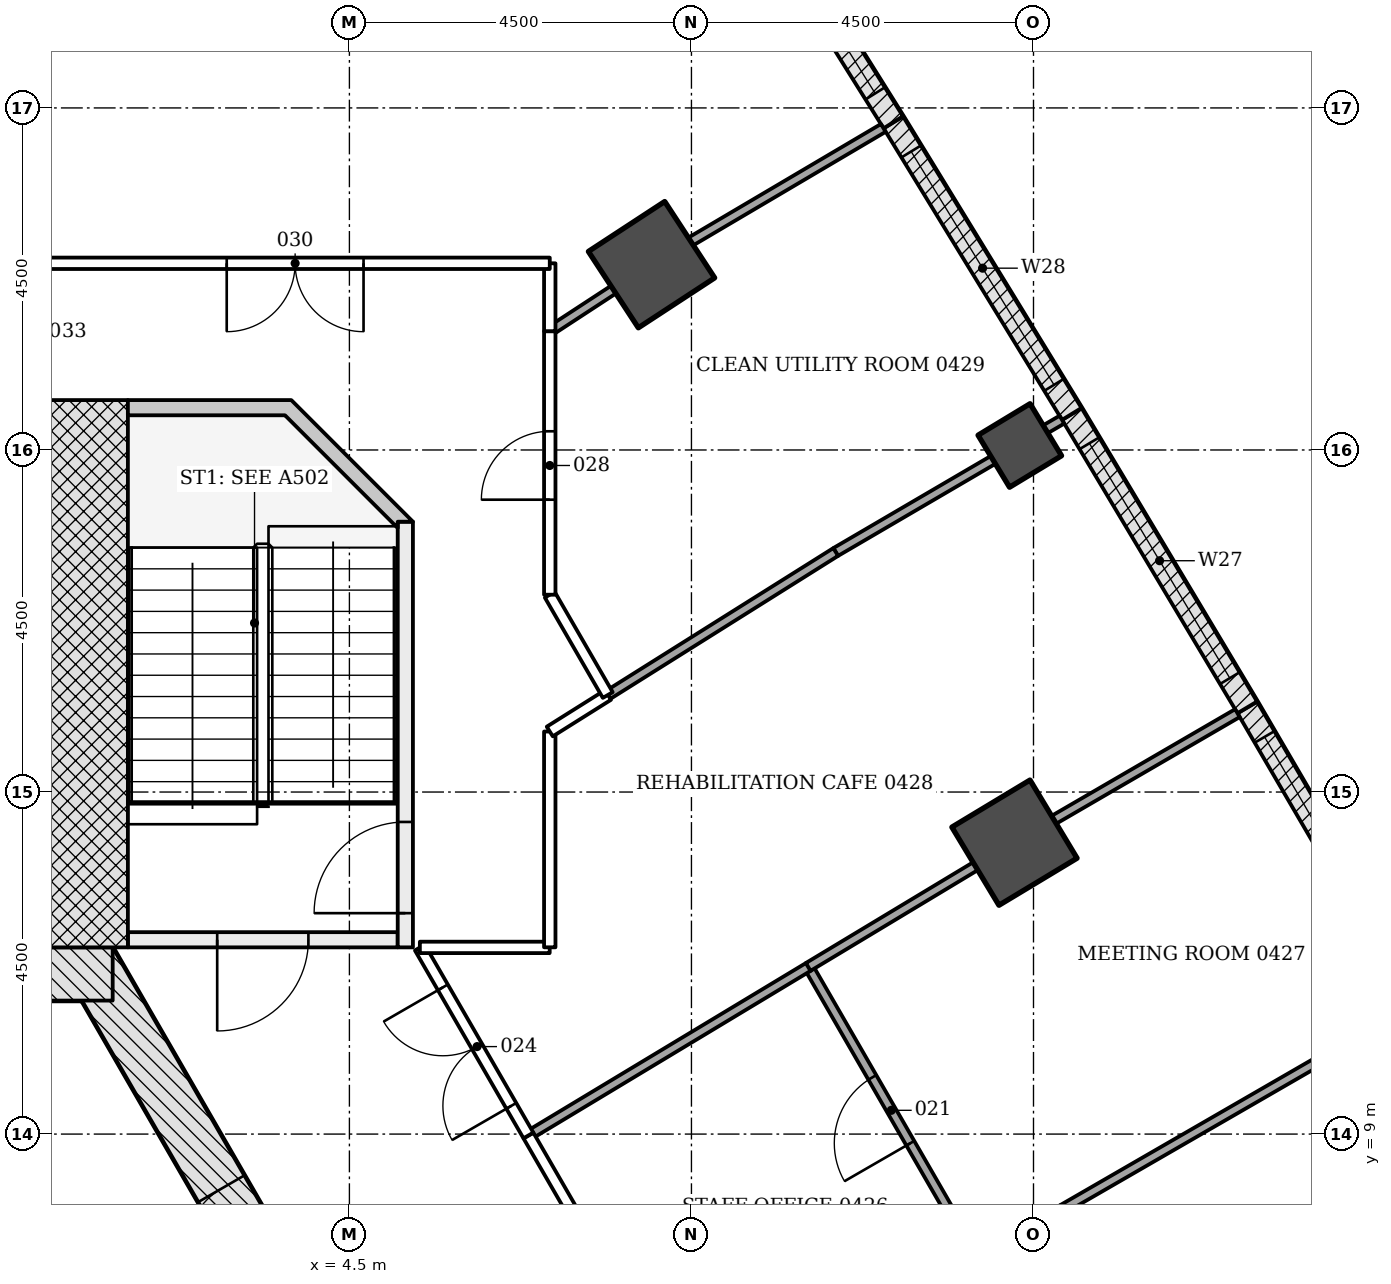
"""IFC4 building model, lengths in metres.
Left out: names, types, materials, properties, quantities, classifications, styles, units other than length and angle.
Written with IfcOpenShell. Run it as: python <this file> out.ifc"""

import sys

from ifc_helpers import new_model, si_unit, direction, frame, frame_2d, origin, origin_2d, place, context, subcontext, project, spatial, polyline, rectangle, outline, extrude, element, fill, save


model = new_model("IFC4")
c1 = context("Model", 3, precision=1e-05, world=origin(), true_north=direction((0.0, 1.0)))
c2 = subcontext(c1, "Body", "Model", "MODEL_VIEW")
j1 = project(units=[si_unit("LENGTHUNIT", "METRE"), si_unit("PLANEANGLEUNIT", "RADIAN")], contexts=[c1])
p1 = place(None, origin())
s1 = spatial("IfcSite", under=j1, at=p1, CompositionType="ELEMENT")
p2 = place(p1, origin())
s2 = spatial("IfcBuilding", under=s1, at=p2, CompositionType="ELEMENT")
p3 = place(p2, frame((0.0, 0.0, 19.5)))
s3 = spatial("IfcBuildingStorey", under=s2, at=p3, CompositionType="ELEMENT", Elevation=19.5)
for number, where, z_axis, x_axis in (
    (1, (13.25, 12.834, -0.25), (0.0, 0.0, 1.0), (0.857, 0.516, 0.0)),
    (2, (8.475, 20.438, -0.25), (0.0, 0.0, 1.0), (0.837, 0.547, 0.0)),
):
    element("IfcColumn", number, at=place(p3, frame(where, z_axis=z_axis, x_axis=x_axis)), inside=s3, PredefinedType="COLUMN", context=c2, shape_type="SweptSolid", body=[
        extrude(rectangle(XDim=1.2, YDim=1.2, at=origin_2d()), origin(), (0.0, 0.0, 1.0), 4.55),
    ])
p4 = place(p3, frame((13.32, 18.059, -0.25), z_axis=(0.0, 0.0, 1.0), x_axis=(0.855574189811, 0.517680215702, 0.0)))
e3 = element("IfcColumn", 3, at=p4, inside=s3, PredefinedType="COLUMN", context=c2, shape_type="SweptSolid", body=[
    extrude(rectangle(XDim=0.8, YDim=0.8, at=origin_2d()), origin(), (0.0, 0.0, 1.0), 4.55),
])
p5 = place(p3, frame((10.311, -4.703, -0.25), z_axis=(0.0, 0.0, 1.0), x_axis=(-0.500001446645, 0.866024568562, 0.0)))
e4 = element("IfcWall", 4, at=p5, inside=s3, PredefinedType="SHEAR", context=c2, shape_type="SweptSolid", body=[
    extrude(rectangle(XDim=18.458, YDim=0.7, at=frame_2d((9.229, 0.0))), origin(), (0.0, 0.0, 1.0), 4.55),
])
p6 = place(p5, frame((8.7, 0.0, 0.25)))
e5 = element("IfcOpeningElement", 5, at=p6, cuts=e4, PredefinedType="OPENING", context=c2, shape_type="SweptSolid", body=[
    extrude(rectangle(XDim=1.0, YDim=2.1, at=frame_2d((0.5, 1.05))), frame((0.0, 0.36, 0.0), z_axis=(0.0, -1.0, 0.0), x_axis=(1.0, 0.0, 0.0)), (0.0, 0.0, 1.0), 0.72),
])
p7 = place(p5, frame((4.002, 0.0, 0.25)))
e6 = element("IfcOpeningElement", 6, at=p7, cuts=e4, PredefinedType="OPENING", context=c2, shape_type="SweptSolid", body=[
    extrude(rectangle(XDim=0.9, YDim=2.1, at=frame_2d((0.45, 1.05))), frame((0.0, 0.36, 0.0), z_axis=(0.0, -1.0, 0.0), x_axis=(1.0, 0.0, 0.0)), (0.0, 0.0, 1.0), 0.72),
])
p8 = place(p5, frame((14.093, 0.0, 0.25)))
e7 = element("IfcOpeningElement", 7, at=p8, cuts=e4, PredefinedType="OPENING", context=c2, shape_type="SweptSolid", body=[
    extrude(rectangle(XDim=0.9, YDim=2.1, at=frame_2d((0.45, 1.05))), frame((0.0, 0.36, 0.0), z_axis=(0.0, -1.0, 0.0), x_axis=(1.0, 0.0, 0.0)), (0.0, 0.0, 1.0), 0.72),
])
p9 = place(p3, frame((1.386, 11.106, -0.25), z_axis=(0.0, 0.0, 1.0), x_axis=(-1.0, 0.0, 0.0)))
e8 = element("IfcWall", 8, at=p9, inside=s3, PredefinedType="SHEAR", context=c2, shape_type="SweptSolid", body=[
    extrude(rectangle(XDim=2.771, YDim=0.7, at=frame_2d((1.386, 0.0))), origin(), (0.0, 0.0, 1.0), 4.55),
])
p10 = place(p3, frame((16.314, 14.612, 0.0), z_axis=(0.0, 0.0, 1.0), x_axis=(0.50445499627, -0.86343798662, 0.0)))
e9 = element("IfcWall", 9, at=p10, inside=s3, PredefinedType="NOTDEFINED", context=c2, shape_type="SweptSolid", body=[
    extrude(rectangle(XDim=4.496, YDim=0.3, at=frame_2d((2.248, 0.0))), origin(), (0.0, 0.0, 1.0), 4.3),
])
p11 = place(p10, frame((0.448, 0.0, 1.5)))
e10 = element("IfcOpeningElement", 10, at=p11, cuts=e9, PredefinedType="OPENING", context=c2, shape_type="SweptSolid", body=[
    extrude(rectangle(XDim=3.6, YDim=1.8, at=frame_2d((1.8, 0.9))), frame((0.0, 0.16, 0.0), z_axis=(0.0, -1.0, 0.0), x_axis=(1.0, 0.0, 0.0)), (0.0, 0.0, 1.0), 0.32),
])
p12 = place(p3, frame((14.005, 18.472, 0.0), z_axis=(0.0, 0.0, 1.0), x_axis=(0.513257465408, -0.858234684805, 0.0)))
e11 = element("IfcWall", 11, at=p12, inside=s3, PredefinedType="NOTDEFINED", context=c2, shape_type="SweptSolid", body=[
    extrude(rectangle(XDim=4.496, YDim=0.3, at=frame_2d((2.248, 0.0))), origin(), (0.0, 0.0, 1.0), 4.3),
])
p13 = place(p12, frame((0.448, 0.0, 1.5)))
e12 = element("IfcOpeningElement", 12, at=p13, cuts=e11, PredefinedType="OPENING", context=c2, shape_type="SweptSolid", body=[
    extrude(rectangle(XDim=3.6, YDim=1.8, at=frame_2d((1.8, 0.9))), frame((0.0, 0.16, 0.0), z_axis=(0.0, -1.0, 0.0), x_axis=(1.0, 0.0, 0.0)), (0.0, 0.0, 1.0), 0.32),
])
p14 = place(p3, frame((11.656, 22.309, 0.0), z_axis=(0.0, 0.0, 1.0), x_axis=(0.522078085402, -0.852897691838, 0.0)))
e13 = element("IfcWall", 13, at=p14, inside=s3, PredefinedType="NOTDEFINED", context=c2, shape_type="SweptSolid", body=[
    extrude(rectangle(XDim=4.496, YDim=0.3, at=frame_2d((2.248, 0.0))), origin(), (0.0, 0.0, 1.0), 4.3),
])
p15 = place(p14, frame((0.448, 0.0, 1.5)))
e14 = element("IfcOpeningElement", 14, at=p15, cuts=e13, PredefinedType="OPENING", context=c2, shape_type="SweptSolid", body=[
    extrude(rectangle(XDim=3.6, YDim=1.8, at=frame_2d((1.8, 0.9))), frame((0.0, 0.16, 0.0), z_axis=(0.0, -1.0, 0.0), x_axis=(1.0, 0.0, 0.0)), (0.0, 0.0, 1.0), 0.32),
])
p16 = place(p3, frame((9.269, 26.122, 0.0), z_axis=(0.0, 0.0, 1.0), x_axis=(0.530804082031, -0.847494558389, 0.0)))
e15 = element("IfcWall", 15, at=p16, inside=s3, PredefinedType="NOTDEFINED", context=c2, shape_type="SweptSolid", body=[
    extrude(rectangle(XDim=4.496, YDim=0.3, at=frame_2d((2.248, 0.0))), origin(), (0.0, 0.0, 1.0), 4.3),
])
p17 = place(p16, frame((0.448, 0.0, 1.5)))
e16 = element("IfcOpeningElement", 16, at=p17, cuts=e15, PredefinedType="OPENING", context=c2, shape_type="SweptSolid", body=[
    extrude(rectangle(XDim=3.6, YDim=1.8, at=frame_2d((1.8, 0.9))), frame((0.0, 0.16, 0.0), z_axis=(0.0, -1.0, 0.0), x_axis=(1.0, 0.0, 0.0)), (0.0, 0.0, 1.0), 0.32),
])
p18 = place(p3, frame((5.135, 11.556, -0.25), z_axis=(0.0, 0.0, 1.0), x_axis=(-1.0, 0.0, 0.0)))
e17 = element("IfcWall", 17, at=p18, inside=s3, PredefinedType="SHEAR", context=c2, shape_type="SweptSolid", body=[
    extrude(rectangle(XDim=3.55, YDim=0.2, at=frame_2d((1.775, 0.0))), origin(), (0.0, 0.0, 1.0), 4.55),
])
p19 = place(p18, frame((1.175, 0.0, 0.25)))
e18 = element("IfcOpeningElement", 18, at=p19, cuts=e17, PredefinedType="OPENING", context=c2, shape_type="SweptSolid", body=[
    extrude(rectangle(XDim=1.2, YDim=2.1, at=frame_2d((0.6, 1.05))), frame((0.0, 0.11, 0.0), z_axis=(0.0, -1.0, 0.0), x_axis=(1.0, 0.0, 0.0)), (0.0, 0.0, 1.0), 0.22),
])
p20 = place(p3, frame((5.236, 11.456, -0.25), z_axis=(0.0, 0.0, 1.0), x_axis=(0.0, 1.0, 0.0)))
e19 = element("IfcWall", 19, at=p20, inside=s3, PredefinedType="SHEAR", context=c2, shape_type="SweptSolid", body=[
    extrude(rectangle(XDim=5.6, YDim=0.2, at=frame_2d((2.8, 0.0))), origin(), (0.0, 0.0, 1.0), 4.55),
])
p21 = place(p20, frame((0.45, 0.0, 0.25)))
e20 = element("IfcOpeningElement", 20, at=p21, cuts=e19, PredefinedType="OPENING", context=c2, shape_type="SweptSolid", body=[
    extrude(rectangle(XDim=1.2, YDim=2.1, at=frame_2d((0.6, 1.05))), frame((0.0, 0.11, 0.0), z_axis=(0.0, -1.0, 0.0), x_axis=(1.0, 0.0, 0.0)), (0.0, 0.0, 1.0), 0.22),
])
p22 = place(p3, frame((1.018, 11.456, -0.25), z_axis=(0.0, 0.0, 1.0), x_axis=(0.0, 1.0, 0.0)))
e21 = element("IfcWall", 21, at=p22, inside=s3, PredefinedType="SHEAR", context=c2, shape_type="SweptSolid", body=[
    extrude(rectangle(XDim=7.2, YDim=1.136, at=frame_2d((3.6, 0.0))), origin(), (0.0, 0.0, 1.0), 4.55),
])
p23 = place(p3, frame((0.0, 0.0, -0.25)))
e22 = element("IfcWall", 22, at=p23, inside=s3, PredefinedType="SHEAR", context=c2, shape_type="SweptSolid", body=[
    extrude(outline(polyline([(5.336, 17.056), (3.736, 18.656), (1.586, 18.656), (1.586, 18.456), (3.653, 18.456), (5.135, 16.974), (5.135, 17.056), (5.135, 17.056), (5.135, 17.056), (5.135, 17.056), (5.135, 17.056), (5.135, 17.056), (5.135, 17.056), (5.135, 17.056), (5.135, 17.056), (5.135, 17.056), (5.135, 17.056), (5.135, 17.056), (5.135, 17.056), (5.135, 17.056), (5.135, 17.056), (5.135, 17.056), (5.135, 17.056), (5.336, 17.056)])), origin(), (0.0, 0.0, 1.0), 4.55),
])
p24 = place(p3, frame((9.03, 5.215, 0.0), z_axis=(0.0, 0.0, 1.0), x_axis=(-0.500070818246, 0.86598451299, 0.0)))
e23 = element("IfcWall", 23, at=p24, inside=s3, PredefinedType="PARTITIONING", context=c2, shape_type="SweptSolid", body=[
    extrude(rectangle(XDim=4.347, YDim=0.15, at=frame_2d((2.174, 0.0))), origin(), (0.0, 0.0, 1.0), 3.688),
])
p25 = place(p24, frame((1.65, 0.0, 0.0)))
e24 = element("IfcOpeningElement", 24, at=p25, cuts=e23, PredefinedType="OPENING", context=c2, shape_type="SweptSolid", body=[
    extrude(rectangle(XDim=1.0, YDim=2.1, at=frame_2d((0.5, 1.05))), frame((0.0, 0.085, 0.0), z_axis=(0.0, -1.0, 0.0), x_axis=(1.0, 0.0, 0.0)), (0.0, 0.0, 1.0), 0.17),
])
p26 = place(p3, frame((6.855, 8.982, 0.0), z_axis=(0.0, 0.0, 1.0), x_axis=(-0.500176439337, 0.865923512519, 0.0)))
e25 = element("IfcWall", 25, at=p26, inside=s3, PredefinedType="PARTITIONING", context=c2, shape_type="SweptSolid", body=[
    extrude(rectangle(XDim=2.855, YDim=0.15, at=frame_2d((1.427, 0.0))), origin(), (0.0, 0.0, 1.0), 3.698),
])
p27 = place(p26, frame((0.45, 0.0, 0.0)))
e26 = element("IfcOpeningElement", 26, at=p27, cuts=e25, PredefinedType="OPENING", context=c2, shape_type="SweptSolid", body=[
    extrude(rectangle(XDim=1.8, YDim=2.1, at=frame_2d((0.9, 1.05))), frame((0.0, 0.085, 0.0), z_axis=(0.0, -1.0, 0.0), x_axis=(1.0, 0.0, 0.0)), (0.0, 0.0, 1.0), 0.17),
])
p28 = place(p3, frame((5.427, 11.456, 0.0), z_axis=(0.0, 0.0, 1.0), x_axis=(1.0, 0.0, 0.0)))
e27 = element("IfcWall", 27, at=p28, inside=s3, PredefinedType="PARTITIONING", context=c2, shape_type="SweptSolid", body=[
    extrude(rectangle(XDim=1.708, YDim=0.15, at=frame_2d((0.854, 0.0))), origin(), (0.0, 0.0, 1.0), 4.3),
])
p29 = place(p3, frame((7.136, 11.457, 0.0), z_axis=(0.0, 0.0, 1.0), x_axis=(0.0, 1.0, 0.0)))
e28 = element("IfcWall", 28, at=p29, inside=s3, PredefinedType="PARTITIONING", context=c2, shape_type="SweptSolid", body=[
    extrude(rectangle(XDim=2.839, YDim=0.15, at=frame_2d((1.419, 0.0))), origin(), (0.0, 0.0, 1.0), 3.843),
])
p30 = place(p3, frame((7.136, 14.296, 0.0), z_axis=(0.0, 0.0, 1.0), x_axis=(0.84681367047, 0.531889657265, 0.0)))
e29 = element("IfcWall", 29, at=p30, inside=s3, PredefinedType="PARTITIONING", context=c2, shape_type="SweptSolid", body=[
    extrude(rectangle(XDim=0.905, YDim=0.15, at=frame_2d((0.452, 0.0))), origin(), (0.0, 0.0, 1.0), 3.843),
])
p31 = place(p3, frame((7.899, 14.776, 0.0), z_axis=(0.0, 0.0, 1.0), x_axis=(-0.500392307633, 0.865798786359, 0.0)))
e30 = element("IfcWall", 30, at=p31, inside=s3, PredefinedType="PARTITIONING", context=c2, shape_type="SweptSolid", body=[
    extrude(rectangle(XDim=1.525, YDim=0.15, at=frame_2d((0.762, 0.0))), origin(), (0.0, 0.0, 1.0), 3.843),
])
p32 = place(p3, frame((7.136, 16.096, 0.0), z_axis=(0.0, 0.0, 1.0), x_axis=(0.0, 1.0, 0.0)))
e31 = element("IfcWall", 31, at=p32, inside=s3, PredefinedType="PARTITIONING", context=c2, shape_type="SweptSolid", body=[
    extrude(rectangle(XDim=3.466, YDim=0.15, at=frame_2d((1.733, 0.0))), origin(), (0.0, 0.0, 1.0), 3.894),
])
p33 = place(p32, frame((1.25, 0.0, 0.0)))
e32 = element("IfcOpeningElement", 32, at=p33, cuts=e31, PredefinedType="OPENING", context=c2, shape_type="SweptSolid", body=[
    extrude(rectangle(XDim=0.9, YDim=2.1, at=frame_2d((0.45, 1.05))), frame((0.0, 0.085, 0.0), z_axis=(0.0, -1.0, 0.0), x_axis=(1.0, 0.0, 0.0)), (0.0, 0.0, 1.0), 0.17),
])
p34 = place(p3, frame((7.136, 19.563, 0.0), z_axis=(0.0, 0.0, 1.0), x_axis=(0.0, 1.0, 0.0)))
e33 = element("IfcWall", 33, at=p34, inside=s3, PredefinedType="PARTITIONING", context=c2, shape_type="SweptSolid", body=[
    extrude(rectangle(XDim=0.893, YDim=0.15, at=frame_2d((0.447, 0.0))), origin(), (0.0, 0.0, 1.0), 3.894),
])
p35 = place(p3, frame((7.136, 20.456, 0.0), z_axis=(0.0, 0.0, 1.0), x_axis=(-1.0, 0.0, 0.0)))
e34 = element("IfcWall", 34, at=p35, inside=s3, PredefinedType="PARTITIONING", context=c2, shape_type="SweptSolid", body=[
    extrude(rectangle(XDim=6.686, YDim=0.15, at=frame_2d((3.343, 0.0))), origin(), (0.0, 0.0, 1.0), 3.843),
])
p36 = place(p35, frame((2.45, 0.0, 0.0)))
e35 = element("IfcOpeningElement", 35, at=p36, cuts=e34, PredefinedType="OPENING", context=c2, shape_type="SweptSolid", body=[
    extrude(rectangle(XDim=1.8, YDim=2.1, at=frame_2d((0.9, 1.05))), frame((0.0, 0.085, 0.0), z_axis=(0.0, -1.0, 0.0), x_axis=(1.0, 0.0, 0.0)), (0.0, 0.0, 1.0), 0.17),
])
p37 = place(p3, frame((17.543, 10.128, 0.0), z_axis=(0.0, 0.0, 1.0), x_axis=(-0.865942311451, -0.500143892533, 0.0)))
e36 = element("IfcWall", 36, at=p37, inside=s3, PredefinedType="PARTITIONING", context=c2, shape_type="SweptSolid", body=[
    extrude(rectangle(XDim=4.229, YDim=0.12, at=frame_2d((2.114, 0.0))), origin(), (0.0, 0.0, 1.0), 3.18),
])
p38 = place(p3, frame((12.754, 7.364, 0.0), z_axis=(0.0, 0.0, 1.0), x_axis=(-0.499862428325, 0.86610481626, 0.0)))
e37 = element("IfcWall", 37, at=p38, inside=s3, PredefinedType="PARTITIONING", context=c2, shape_type="SweptSolid", body=[
    extrude(rectangle(XDim=4.429, YDim=0.12, at=frame_2d((2.214, 0.0))), origin(), (0.0, 0.0, 1.0), 3.688),
])
p39 = place(p38, frame((1.75, 0.0, 0.0)))
e38 = element("IfcOpeningElement", 38, at=p39, cuts=e37, PredefinedType="OPENING", context=c2, shape_type="SweptSolid", body=[
    extrude(rectangle(XDim=1.0, YDim=2.1, at=frame_2d((0.5, 1.05))), frame((0.0, 0.07, 0.0), z_axis=(0.0, -1.0, 0.0), x_axis=(1.0, 0.0, 0.0)), (0.0, 0.0, 1.0), 0.14),
])
p40 = place(p3, frame((10.544, 11.203, 0.0), z_axis=(0.0, 0.0, 1.0), x_axis=(-0.85659577265, -0.515988064084, 0.0)))
e39 = element("IfcWall", 39, at=p40, inside=s3, PredefinedType="PARTITIONING", context=c2, shape_type="SweptSolid", body=[
    extrude(rectangle(XDim=4.304, YDim=0.12, at=frame_2d((2.152, 0.0))), origin(), (0.0, 0.0, 1.0), 3.698),
])
p41 = place(p3, frame((12.736, 12.524, 0.0), z_axis=(0.0, 0.0, 1.0), x_axis=(-0.85666145055, -0.515879015993, 0.0)))
e40 = element("IfcWall", 40, at=p41, inside=s3, PredefinedType="PARTITIONING", context=c2, shape_type="SweptSolid", body=[
    extrude(rectangle(XDim=2.568, YDim=0.12, at=frame_2d((1.284, 0.0))), origin(), (0.0, 0.0, 1.0), 3.698),
])
p42 = place(p3, frame((16.183, 14.538, 0.0), z_axis=(0.0, 0.0, 1.0), x_axis=(-0.864576979504, -0.50250039454, 0.0)))
e41 = element("IfcWall", 41, at=p42, inside=s3, PredefinedType="PARTITIONING", context=c2, shape_type="SweptSolid", body=[
    extrude(rectangle(XDim=2.792, YDim=0.12, at=frame_2d((1.396, 0.0))), origin(), (0.0, 0.0, 1.0), 3.683),
])
p43 = place(p3, frame((12.968, 17.869, 0.0), z_axis=(0.0, 0.0, 1.0), x_axis=(-0.863161652457, -0.504927679701, 0.0)))
e42 = element("IfcWall", 42, at=p43, inside=s3, PredefinedType="PARTITIONING", context=c2, shape_type="SweptSolid", body=[
    extrude(rectangle(XDim=2.398, YDim=0.12, at=frame_2d((1.199, 0.0))), origin(), (0.0, 0.0, 1.0), 3.18),
])
p44 = place(p3, frame((10.898, 16.658, 0.0), z_axis=(0.0, 0.0, 1.0), x_axis=(-0.846864700387, -0.531808404634, 0.0)))
e43 = element("IfcWall", 43, at=p44, inside=s3, PredefinedType="PARTITIONING", context=c2, shape_type="SweptSolid", body=[
    extrude(rectangle(XDim=3.539, YDim=0.12, at=frame_2d((1.77, 0.0))), origin(), (0.0, 0.0, 1.0), 3.18),
])
p45 = place(p3, frame((13.874, 18.399, 0.0), z_axis=(0.0, 0.0, 1.0), x_axis=(-0.863885093979, -0.503688936151, 0.0)))
e44 = element("IfcWall", 44, at=p45, inside=s3, PredefinedType="PARTITIONING", context=c2, shape_type="SweptSolid", body=[
    extrude(rectangle(XDim=0.25, YDim=0.12, at=frame_2d((0.125, 0.0))), origin(), (0.0, 0.0, 1.0), 4.3),
])
p46 = place(p3, frame((7.973, 20.109, 0.0), z_axis=(0.0, 0.0, 1.0), x_axis=(-0.836986858992, -0.547222987341, 0.0)))
e45 = element("IfcWall", 45, at=p46, inside=s3, PredefinedType="PARTITIONING", context=c2, shape_type="SweptSolid", body=[
    extrude(rectangle(XDim=0.998, YDim=0.12, at=frame_2d((0.499, 0.0))), origin(), (0.0, 0.0, 1.0), 3.894),
])
p47 = place(p3, frame((11.524, 22.237, 0.0), z_axis=(0.0, 0.0, 1.0), x_axis=(-0.861228913487, -0.508217235613, 0.0)))
e46 = element("IfcWall", 46, at=p47, inside=s3, PredefinedType="PARTITIONING", context=c2, shape_type="SweptSolid", body=[
    extrude(rectangle(XDim=2.94, YDim=0.12, at=frame_2d((1.47, 0.0))), origin(), (0.0, 0.0, 1.0), 3.683),
])
p48 = place(p11, origin())
e47 = element("IfcWindow", 47, at=p48, inside=s3, PartitioningType="SINGLE_PANEL", PredefinedType="WINDOW", context=c2, shape_type="SweptSolid", body=[
    extrude(rectangle(XDim=3.6, YDim=1.8, at=frame_2d((1.8, 0.9))), frame((0.0, 0.03, 0.0), z_axis=(0.0, -1.0, 0.0), x_axis=(1.0, 0.0, 0.0)), (0.0, 0.0, 1.0), 0.06),
])
fill(e10, e47)
p49 = place(p13, origin())
e48 = element("IfcWindow", 48, at=p49, inside=s3, PartitioningType="SINGLE_PANEL", PredefinedType="WINDOW", context=c2, shape_type="SweptSolid", body=[
    extrude(rectangle(XDim=3.6, YDim=1.8, at=frame_2d((1.8, 0.9))), frame((0.0, 0.03, 0.0), z_axis=(0.0, -1.0, 0.0), x_axis=(1.0, 0.0, 0.0)), (0.0, 0.0, 1.0), 0.06),
])
fill(e12, e48)
p50 = place(p15, origin())
e49 = element("IfcWindow", 49, at=p50, inside=s3, PartitioningType="SINGLE_PANEL", PredefinedType="WINDOW", context=c2, shape_type="SweptSolid", body=[
    extrude(rectangle(XDim=3.6, YDim=1.8, at=frame_2d((1.8, 0.9))), frame((0.0, 0.03, 0.0), z_axis=(0.0, -1.0, 0.0), x_axis=(1.0, 0.0, 0.0)), (0.0, 0.0, 1.0), 0.06),
])
fill(e14, e49)
p51 = place(p17, origin())
e50 = element("IfcWindow", 50, at=p51, inside=s3, PartitioningType="SINGLE_PANEL", PredefinedType="WINDOW", context=c2, shape_type="SweptSolid", body=[
    extrude(rectangle(XDim=3.6, YDim=1.8, at=frame_2d((1.8, 0.9))), frame((0.0, 0.03, 0.0), z_axis=(0.0, -1.0, 0.0), x_axis=(1.0, 0.0, 0.0)), (0.0, 0.0, 1.0), 0.06),
])
fill(e16, e50)
p52 = place(p8, origin())
e51 = element("IfcDoor", 51, at=p52, inside=s3, OperationType="SINGLE_SWING_LEFT", PredefinedType="DOOR", context=c2, shape_type="SweptSolid", body=[
    extrude(rectangle(XDim=0.9, YDim=2.1, at=frame_2d((0.45, 1.05))), frame((0.0, 0.075, 0.0), z_axis=(0.0, -1.0, 0.0), x_axis=(1.0, 0.0, 0.0)), (0.0, 0.0, 1.0), 0.15),
])
fill(e7, e51)
p53 = place(p19, origin())
e52 = element("IfcDoor", 52, at=p53, inside=s3, OperationType="SINGLE_SWING_RIGHT", PredefinedType="DOOR", context=c2, shape_type="SweptSolid", body=[
    extrude(rectangle(XDim=1.2, YDim=2.1, at=frame_2d((0.6, 1.05))), frame((0.0, 0.025, 0.0), z_axis=(0.0, -1.0, 0.0), x_axis=(1.0, 0.0, 0.0)), (0.0, 0.0, 1.0), 0.05),
])
fill(e18, e52)
p54 = place(p21, origin())
e53 = element("IfcDoor", 53, at=p54, inside=s3, OperationType="SINGLE_SWING_LEFT", PredefinedType="DOOR", context=c2, shape_type="SweptSolid", body=[
    extrude(rectangle(XDim=1.2, YDim=2.1, at=frame_2d((0.6, 1.05))), frame((0.0, 0.025, 0.0), z_axis=(0.0, -1.0, 0.0), x_axis=(1.0, 0.0, 0.0)), (0.0, 0.0, 1.0), 0.05),
])
fill(e20, e53)
p55 = place(p39, origin())
e54 = element("IfcDoor", 54, at=p55, inside=s3, OperationType="SINGLE_SWING_LEFT", PredefinedType="DOOR", context=c2, shape_type="SweptSolid", body=[
    extrude(rectangle(XDim=1.0, YDim=2.1, at=frame_2d((0.5, 1.05))), frame((0.0, 0.025, 0.0), z_axis=(0.0, -1.0, 0.0), x_axis=(1.0, 0.0, 0.0)), (0.0, 0.0, 1.0), 0.05),
])
fill(e38, e54)
p56 = place(p27, origin())
e55 = element("IfcDoor", 55, at=p56, inside=s3, OperationType="DOUBLE_DOOR_SINGLE_SWING", PredefinedType="DOOR", context=c2, shape_type="SweptSolid", body=[
    extrude(rectangle(XDim=1.8, YDim=2.1, at=frame_2d((0.9, 1.05))), frame((0.0, 0.025, 0.0), z_axis=(0.0, -1.0, 0.0), x_axis=(1.0, 0.0, 0.0)), (0.0, 0.0, 1.0), 0.05),
])
fill(e26, e55)
p57 = place(p33, origin())
e56 = element("IfcDoor", 56, at=p57, inside=s3, OperationType="SINGLE_SWING_RIGHT", PredefinedType="DOOR", context=c2, shape_type="SweptSolid", body=[
    extrude(rectangle(XDim=0.9, YDim=2.1, at=frame_2d((0.45, 1.05))), frame((0.0, 0.025, 0.0), z_axis=(0.0, -1.0, 0.0), x_axis=(1.0, 0.0, 0.0)), (0.0, 0.0, 1.0), 0.05),
])
fill(e32, e56)
p58 = place(p36, origin())
e57 = element("IfcDoor", 57, at=p58, inside=s3, OperationType="DOUBLE_DOOR_SINGLE_SWING", PredefinedType="DOOR", context=c2, shape_type="SweptSolid", body=[
    extrude(rectangle(XDim=1.8, YDim=2.1, at=frame_2d((0.9, 1.05))), frame((0.0, 0.025, 0.0), z_axis=(0.0, -1.0, 0.0), x_axis=(1.0, 0.0, 0.0)), (0.0, 0.0, 1.0), 0.05),
])
fill(e35, e57)
save(model, sys.argv[1])
